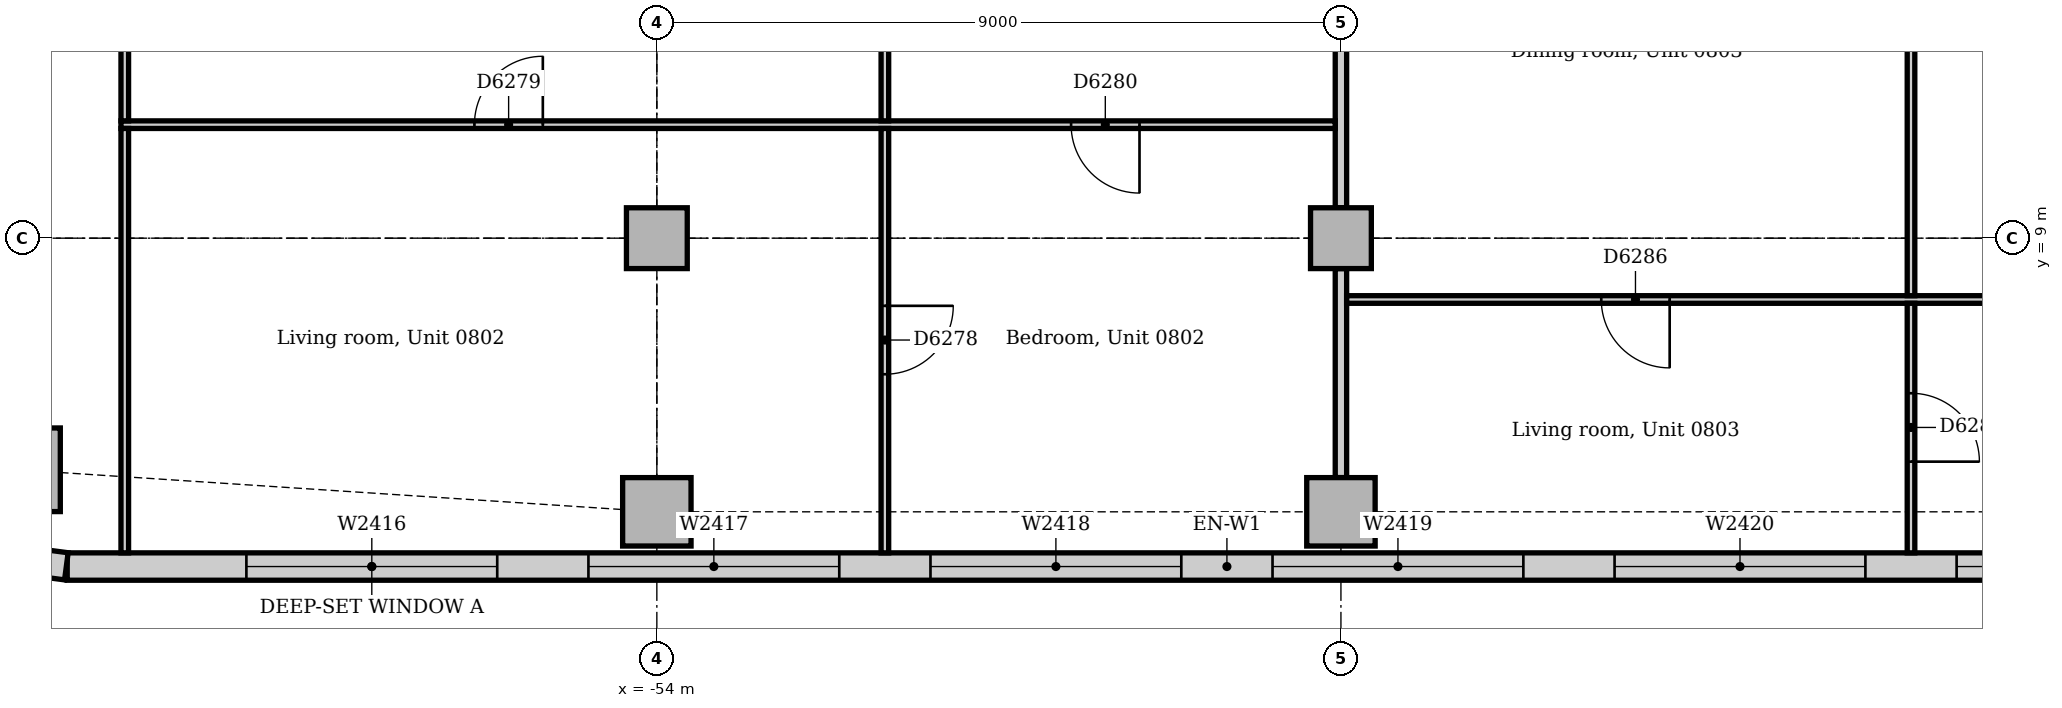
"""IFC4 building model, lengths in metres.
Left out: names, types, materials, properties, quantities, classifications, styles, units other than length and angle.
Written with IfcOpenShell. Run it as: python <this file> out.ifc"""

import sys

from ifc_helpers import new_model, si_unit, direction, frame, frame_2d, origin, origin_2d, place, context, subcontext, project, spatial, rectangle, extrude, element, fill, save


model = new_model("IFC4")
c1 = context("Model", 3, precision=1e-05, world=origin(), true_north=direction((0.0, 1.0)))
c2 = subcontext(c1, "Body", "Model", "MODEL_VIEW")
j1 = project(units=[si_unit("LENGTHUNIT", "METRE"), si_unit("PLANEANGLEUNIT", "RADIAN")], contexts=[c1])
p1 = place(None, origin())
s1 = spatial("IfcSite", under=j1, at=p1, CompositionType="ELEMENT")
p2 = place(p1, origin())
s2 = spatial("IfcBuilding", under=s1, at=p2, CompositionType="ELEMENT")
p3 = place(p2, frame((0.0, 0.0, 38.0)))
s3 = spatial("IfcBuildingStorey", under=s2, at=p3, CompositionType="ELEMENT", Elevation=38.0)
p4 = place(p3, frame((-62.398, 5.953, 0.0), z_axis=(0.0, 0.0, 1.0), x_axis=(1.0, 0.0, 0.0)))
e1 = element("IfcColumn", 1, at=p4, inside=s3, PredefinedType="COLUMN", context=c2, shape_type="SweptSolid", body=[
    extrude(rectangle(XDim=1.1, YDim=1.1, at=origin_2d()), origin(), (0.0, 0.0, 1.0), 3.85),
])
for number, where, z_axis, x_axis in (
    (2, (-54.0, 5.4, 0.0), (0.0, 0.0, 1.0), (1.0, 0.0, 0.0)),
    (3, (-45.0, 5.4, 0.0), (0.0, 0.0, 1.0), (1.0, 0.0, 0.0)),
):
    element("IfcColumn", number, at=place(p3, frame(where, z_axis=z_axis, x_axis=x_axis)), inside=s3, PredefinedType="COLUMN", context=c2, shape_type="SweptSolid", body=[
        extrude(rectangle(XDim=0.9, YDim=0.9, at=origin_2d()), origin(), (0.0, 0.0, 1.0), 3.85),
    ])
for number, where, z_axis, x_axis in (
    (4, (-54.0, 9.0, 0.0), (0.0, 0.0, 1.0), (1.0, 0.0, 0.0)),
    (5, (-45.0, 9.0, 0.0), (0.0, 0.0, 1.0), (1.0, 0.0, 0.0)),
):
    element("IfcColumn", number, at=place(p3, frame(where, z_axis=z_axis, x_axis=x_axis)), inside=s3, PredefinedType="COLUMN", context=c2, shape_type="SweptSolid", body=[
        extrude(rectangle(XDim=0.8, YDim=0.8, at=origin_2d()), origin(), (0.0, 0.0, 1.0), 3.85),
    ])
p5 = place(p3, frame((-61.757, 4.68, 0.0), z_axis=(0.0, 0.0, 1.0), x_axis=(1.0, 0.0, 0.0)))
e6 = element("IfcWall", 6, at=p5, inside=s3, PredefinedType="STANDARD", context=c2, shape_type="SweptSolid", body=[
    extrude(rectangle(XDim=30.515, YDim=0.36, at=frame_2d((15.257, 0.0))), origin(), (0.0, 0.0, 1.0), 3.85),
])
p6 = place(p5, frame((2.357, 0.0, 0.9)))
e7 = element("IfcOpeningElement", 7, at=p6, cuts=e6, PredefinedType="OPENING", context=c2, shape_type="SweptSolid", body=[
    extrude(rectangle(XDim=3.3, YDim=1.6, at=frame_2d((1.65, 0.8))), frame((0.0, 0.19, 0.0), z_axis=(0.0, -1.0, 0.0), x_axis=(1.0, 0.0, 0.0)), (0.0, 0.0, 1.0), 0.38),
])
p7 = place(p5, frame((6.857, 0.0, 0.9)))
e8 = element("IfcOpeningElement", 8, at=p7, cuts=e6, PredefinedType="OPENING", context=c2, shape_type="SweptSolid", body=[
    extrude(rectangle(XDim=3.3, YDim=1.6, at=frame_2d((1.65, 0.8))), frame((0.0, 0.19, 0.0), z_axis=(0.0, -1.0, 0.0), x_axis=(1.0, 0.0, 0.0)), (0.0, 0.0, 1.0), 0.38),
])
p8 = place(p5, frame((11.357, 0.0, 0.9)))
e9 = element("IfcOpeningElement", 9, at=p8, cuts=e6, PredefinedType="OPENING", context=c2, shape_type="SweptSolid", body=[
    extrude(rectangle(XDim=3.3, YDim=1.6, at=frame_2d((1.65, 0.8))), frame((0.0, 0.19, 0.0), z_axis=(0.0, -1.0, 0.0), x_axis=(1.0, 0.0, 0.0)), (0.0, 0.0, 1.0), 0.38),
])
p9 = place(p5, frame((15.857, 0.0, 0.9)))
e10 = element("IfcOpeningElement", 10, at=p9, cuts=e6, PredefinedType="OPENING", context=c2, shape_type="SweptSolid", body=[
    extrude(rectangle(XDim=3.3, YDim=1.6, at=frame_2d((1.65, 0.8))), frame((0.0, 0.19, 0.0), z_axis=(0.0, -1.0, 0.0), x_axis=(1.0, 0.0, 0.0)), (0.0, 0.0, 1.0), 0.38),
])
p10 = place(p5, frame((20.357, 0.0, 0.9)))
e11 = element("IfcOpeningElement", 11, at=p10, cuts=e6, PredefinedType="OPENING", context=c2, shape_type="SweptSolid", body=[
    extrude(rectangle(XDim=3.3, YDim=1.6, at=frame_2d((1.65, 0.8))), frame((0.0, 0.19, 0.0), z_axis=(0.0, -1.0, 0.0), x_axis=(1.0, 0.0, 0.0)), (0.0, 0.0, 1.0), 0.38),
])
p11 = place(p5, frame((24.857, 0.0, 0.9)))
e12 = element("IfcOpeningElement", 12, at=p11, cuts=e6, PredefinedType="OPENING", context=c2, shape_type="SweptSolid", body=[
    extrude(rectangle(XDim=3.3, YDim=1.6, at=frame_2d((1.65, 0.8))), frame((0.0, 0.19, 0.0), z_axis=(0.0, -1.0, 0.0), x_axis=(1.0, 0.0, 0.0)), (0.0, 0.0, 1.0), 0.38),
])
p12 = place(p3, frame((-62.476, 4.776, 0.0), z_axis=(0.0, 0.0, 1.0), x_axis=(0.99144092581, -0.13055608231, 0.0)))
e13 = element("IfcWall", 13, at=p12, inside=s3, PredefinedType="STANDARD", context=c2, shape_type="SweptSolid", body=[
    extrude(rectangle(XDim=0.713, YDim=0.36, at=frame_2d((0.356, 0.0))), origin(), (0.0, 0.0, 1.0), 3.85),
])
p13 = place(p3, frame((-45.0, 9.4, 0.0), z_axis=(0.0, 0.0, 1.0), x_axis=(0.0, 1.0, 0.0)))
e14 = element("IfcWall", 14, at=p13, inside=s3, PredefinedType="PARTITIONING", context=c2, shape_type="SweptSolid", body=[
    extrude(rectangle(XDim=8.2, YDim=0.15, at=frame_2d((4.1, 0.0))), origin(), (0.0, 0.0, 1.0), 3.158),
])
p14 = place(p3, frame((-45.0, 5.85, 0.0), z_axis=(0.0, 0.0, 1.0), x_axis=(0.0, 1.0, 0.0)))
e15 = element("IfcWall", 15, at=p14, inside=s3, PredefinedType="PARTITIONING", context=c2, shape_type="SweptSolid", body=[
    extrude(rectangle(XDim=2.75, YDim=0.15, at=frame_2d((1.375, 0.0))), origin(), (0.0, 0.0, 1.0), 3.652),
])
p15 = place(p3, frame((-44.925, 8.193, 0.0), z_axis=(0.0, 0.0, 1.0), x_axis=(1.0, 0.0, 0.0)))
e16 = element("IfcWall", 16, at=p15, inside=s3, PredefinedType="PARTITIONING", context=c2, shape_type="SweptSolid", body=[
    extrude(rectangle(XDim=15.922, YDim=0.1, at=frame_2d((7.961, 0.0))), origin(), (0.0, 0.0, 1.0), 3.85),
])
p16 = place(p15, frame((3.35, 0.0, 0.0)))
e17 = element("IfcOpeningElement", 17, at=p16, cuts=e16, PredefinedType="OPENING", context=c2, shape_type="SweptSolid", body=[
    extrude(rectangle(XDim=0.9, YDim=2.1, at=frame_2d((0.45, 1.05))), frame((0.0, 0.06, 0.0), z_axis=(0.0, -1.0, 0.0), x_axis=(1.0, 0.0, 0.0)), (0.0, 0.0, 1.0), 0.12),
])
p17 = place(p15, frame((11.125, 0.0, 0.0)))
e18 = element("IfcOpeningElement", 18, at=p17, cuts=e16, PredefinedType="OPENING", context=c2, shape_type="SweptSolid", body=[
    extrude(rectangle(XDim=0.9, YDim=2.1, at=frame_2d((0.45, 1.05))), frame((0.0, 0.06, 0.0), z_axis=(0.0, -1.0, 0.0), x_axis=(1.0, 0.0, 0.0)), (0.0, 0.0, 1.0), 0.12),
])
p18 = place(p3, frame((-61.05, 10.493, 0.0), z_axis=(0.0, 0.0, 1.0), x_axis=(1.0, 0.0, 0.0)))
e19 = element("IfcWall", 19, at=p18, inside=s3, PredefinedType="PARTITIONING", context=c2, shape_type="SweptSolid", body=[
    extrude(rectangle(XDim=15.975, YDim=0.1, at=frame_2d((7.987, 0.0))), origin(), (0.0, 0.0, 1.0), 3.85),
])
p19 = place(p18, frame((4.65, 0.0, 0.0)))
e20 = element("IfcOpeningElement", 20, at=p19, cuts=e19, PredefinedType="OPENING", context=c2, shape_type="SweptSolid", body=[
    extrude(rectangle(XDim=0.9, YDim=2.1, at=frame_2d((0.45, 1.05))), frame((0.0, 0.06, 0.0), z_axis=(0.0, -1.0, 0.0), x_axis=(1.0, 0.0, 0.0)), (0.0, 0.0, 1.0), 0.12),
])
p20 = place(p18, frame((12.5, 0.0, 0.0)))
e21 = element("IfcOpeningElement", 21, at=p20, cuts=e19, PredefinedType="OPENING", context=c2, shape_type="SweptSolid", body=[
    extrude(rectangle(XDim=0.9, YDim=2.1, at=frame_2d((0.45, 1.05))), frame((0.0, 0.06, 0.0), z_axis=(0.0, -1.0, 0.0), x_axis=(1.0, 0.0, 0.0)), (0.0, 0.0, 1.0), 0.12),
])
p21 = place(p3, frame((-61.0, 10.543, 0.0), z_axis=(0.0, 0.0, 1.0), x_axis=(0.0, 1.0, 0.0)))
e22 = element("IfcWall", 22, at=p21, inside=s3, PredefinedType="PARTITIONING", context=c2, shape_type="SweptSolid", body=[
    extrude(rectangle(XDim=4.207, YDim=0.1, at=frame_2d((2.103, 0.0))), origin(), (0.0, 0.0, 1.0), 3.85),
])
p22 = place(p3, frame((-61.0, 4.86, 0.0), z_axis=(0.0, 0.0, 1.0), x_axis=(0.0, 1.0, 0.0)))
e23 = element("IfcWall", 23, at=p22, inside=s3, PredefinedType="PARTITIONING", context=c2, shape_type="SweptSolid", body=[
    extrude(rectangle(XDim=5.583, YDim=0.1, at=frame_2d((2.792, 0.0))), origin(), (0.0, 0.0, 1.0), 3.85),
])
p23 = place(p3, frame((-51.0, 10.543, 0.0), z_axis=(0.0, 0.0, 1.0), x_axis=(0.0, 1.0, 0.0)))
e24 = element("IfcWall", 24, at=p23, inside=s3, PredefinedType="PARTITIONING", context=c2, shape_type="SweptSolid", body=[
    extrude(rectangle(XDim=4.207, YDim=0.1, at=frame_2d((2.103, 0.0))), origin(), (0.0, 0.0, 1.0), 3.85),
])
p24 = place(p3, frame((-51.0, 4.86, 0.0), z_axis=(0.0, 0.0, 1.0), x_axis=(0.0, 1.0, 0.0)))
e25 = element("IfcWall", 25, at=p24, inside=s3, PredefinedType="PARTITIONING", context=c2, shape_type="SweptSolid", body=[
    extrude(rectangle(XDim=5.583, YDim=0.1, at=frame_2d((2.792, 0.0))), origin(), (0.0, 0.0, 1.0), 3.85),
])
p25 = place(p24, frame((2.35, 0.0, 0.0)))
e26 = element("IfcOpeningElement", 26, at=p25, cuts=e25, PredefinedType="OPENING", context=c2, shape_type="SweptSolid", body=[
    extrude(rectangle(XDim=0.9, YDim=2.1, at=frame_2d((0.45, 1.05))), frame((0.0, 0.06, 0.0), z_axis=(0.0, -1.0, 0.0), x_axis=(1.0, 0.0, 0.0)), (0.0, 0.0, 1.0), 0.12),
])
p26 = place(p3, frame((-37.5, 8.243, 0.0), z_axis=(0.0, 0.0, 1.0), x_axis=(0.0, 1.0, 0.0)))
e27 = element("IfcWall", 27, at=p26, inside=s3, PredefinedType="PARTITIONING", context=c2, shape_type="SweptSolid", body=[
    extrude(rectangle(XDim=6.507, YDim=0.1, at=frame_2d((3.253, 0.0))), origin(), (0.0, 0.0, 1.0), 3.85),
])
p27 = place(p3, frame((-37.5, 4.86, 0.0), z_axis=(0.0, 0.0, 1.0), x_axis=(0.0, 1.0, 0.0)))
e28 = element("IfcWall", 28, at=p27, inside=s3, PredefinedType="PARTITIONING", context=c2, shape_type="SweptSolid", body=[
    extrude(rectangle(XDim=3.283, YDim=0.1, at=frame_2d((1.642, 0.0))), origin(), (0.0, 0.0, 1.0), 3.85),
])
p28 = place(p27, frame((1.2, 0.0, 0.0)))
e29 = element("IfcOpeningElement", 29, at=p28, cuts=e28, PredefinedType="OPENING", context=c2, shape_type="SweptSolid", body=[
    extrude(rectangle(XDim=0.9, YDim=2.1, at=frame_2d((0.45, 1.05))), frame((0.0, 0.06, 0.0), z_axis=(0.0, -1.0, 0.0), x_axis=(1.0, 0.0, 0.0)), (0.0, 0.0, 1.0), 0.12),
])
p29 = place(p6, origin())
e30 = element("IfcWindow", 30, at=p29, inside=s3, PartitioningType="SINGLE_PANEL", PredefinedType="WINDOW", context=c2, shape_type="SweptSolid", body=[
    extrude(rectangle(XDim=3.3, YDim=1.6, at=frame_2d((1.65, 0.8))), frame((0.0, 0.13, 0.0), z_axis=(0.0, -1.0, 0.0), x_axis=(1.0, 0.0, 0.0)), (0.0, 0.0, 1.0), 0.06),
])
fill(e7, e30)
p30 = place(p7, origin())
e31 = element("IfcWindow", 31, at=p30, inside=s3, PartitioningType="SINGLE_PANEL", PredefinedType="WINDOW", context=c2, shape_type="SweptSolid", body=[
    extrude(rectangle(XDim=3.3, YDim=1.6, at=frame_2d((1.65, 0.8))), frame((0.0, 0.13, 0.0), z_axis=(0.0, -1.0, 0.0), x_axis=(1.0, 0.0, 0.0)), (0.0, 0.0, 1.0), 0.06),
])
fill(e8, e31)
p31 = place(p8, origin())
e32 = element("IfcWindow", 32, at=p31, inside=s3, PartitioningType="SINGLE_PANEL", PredefinedType="WINDOW", context=c2, shape_type="SweptSolid", body=[
    extrude(rectangle(XDim=3.3, YDim=1.6, at=frame_2d((1.65, 0.8))), frame((0.0, 0.13, 0.0), z_axis=(0.0, -1.0, 0.0), x_axis=(1.0, 0.0, 0.0)), (0.0, 0.0, 1.0), 0.06),
])
fill(e9, e32)
p32 = place(p9, origin())
e33 = element("IfcWindow", 33, at=p32, inside=s3, PartitioningType="SINGLE_PANEL", PredefinedType="WINDOW", context=c2, shape_type="SweptSolid", body=[
    extrude(rectangle(XDim=3.3, YDim=1.6, at=frame_2d((1.65, 0.8))), frame((0.0, 0.13, 0.0), z_axis=(0.0, -1.0, 0.0), x_axis=(1.0, 0.0, 0.0)), (0.0, 0.0, 1.0), 0.06),
])
fill(e10, e33)
p33 = place(p10, origin())
e34 = element("IfcWindow", 34, at=p33, inside=s3, PartitioningType="SINGLE_PANEL", PredefinedType="WINDOW", context=c2, shape_type="SweptSolid", body=[
    extrude(rectangle(XDim=3.3, YDim=1.6, at=frame_2d((1.65, 0.8))), frame((0.0, 0.13, 0.0), z_axis=(0.0, -1.0, 0.0), x_axis=(1.0, 0.0, 0.0)), (0.0, 0.0, 1.0), 0.06),
])
fill(e11, e34)
p34 = place(p11, origin())
e35 = element("IfcWindow", 35, at=p34, inside=s3, PartitioningType="SINGLE_PANEL", PredefinedType="WINDOW", context=c2, shape_type="SweptSolid", body=[
    extrude(rectangle(XDim=3.3, YDim=1.6, at=frame_2d((1.65, 0.8))), frame((0.0, 0.13, 0.0), z_axis=(0.0, -1.0, 0.0), x_axis=(1.0, 0.0, 0.0)), (0.0, 0.0, 1.0), 0.06),
])
fill(e12, e35)
p35 = place(p25, frame((0.9, 0.0, 0.0), z_axis=(0.0, 0.0, 1.0), x_axis=(-1.0, 0.0, 0.0)))
e36 = element("IfcDoor", 36, at=p35, inside=s3, OperationType="SINGLE_SWING_LEFT", PredefinedType="DOOR", context=c2, shape_type="SweptSolid", body=[
    extrude(rectangle(XDim=0.9, YDim=2.1, at=frame_2d((0.45, 1.05))), frame((0.0, 0.025, 0.0), z_axis=(0.0, -1.0, 0.0), x_axis=(1.0, 0.0, 0.0)), (0.0, 0.0, 1.0), 0.05),
])
fill(e26, e36)
p36 = place(p19, origin())
e37 = element("IfcDoor", 37, at=p36, inside=s3, OperationType="SINGLE_SWING_RIGHT", PredefinedType="DOOR", context=c2, shape_type="SweptSolid", body=[
    extrude(rectangle(XDim=0.9, YDim=2.1, at=frame_2d((0.45, 1.05))), frame((0.0, 0.025, 0.0), z_axis=(0.0, -1.0, 0.0), x_axis=(1.0, 0.0, 0.0)), (0.0, 0.0, 1.0), 0.05),
])
fill(e20, e37)
p37 = place(p20, frame((0.9, 0.0, 0.0), z_axis=(0.0, 0.0, 1.0), x_axis=(-1.0, 0.0, 0.0)))
e38 = element("IfcDoor", 38, at=p37, inside=s3, OperationType="SINGLE_SWING_LEFT", PredefinedType="DOOR", context=c2, shape_type="SweptSolid", body=[
    extrude(rectangle(XDim=0.9, YDim=2.1, at=frame_2d((0.45, 1.05))), frame((0.0, 0.025, 0.0), z_axis=(0.0, -1.0, 0.0), x_axis=(1.0, 0.0, 0.0)), (0.0, 0.0, 1.0), 0.05),
])
fill(e21, e38)
p38 = place(p28, frame((0.9, 0.0, 0.0), z_axis=(0.0, 0.0, 1.0), x_axis=(-1.0, 0.0, 0.0)))
e39 = element("IfcDoor", 39, at=p38, inside=s3, OperationType="SINGLE_SWING_RIGHT", PredefinedType="DOOR", context=c2, shape_type="SweptSolid", body=[
    extrude(rectangle(XDim=0.9, YDim=2.1, at=frame_2d((0.45, 1.05))), frame((0.0, 0.025, 0.0), z_axis=(0.0, -1.0, 0.0), x_axis=(1.0, 0.0, 0.0)), (0.0, 0.0, 1.0), 0.05),
])
fill(e29, e39)
p39 = place(p16, frame((0.9, 0.0, 0.0), z_axis=(0.0, 0.0, 1.0), x_axis=(-1.0, 0.0, 0.0)))
e40 = element("IfcDoor", 40, at=p39, inside=s3, OperationType="SINGLE_SWING_LEFT", PredefinedType="DOOR", context=c2, shape_type="SweptSolid", body=[
    extrude(rectangle(XDim=0.9, YDim=2.1, at=frame_2d((0.45, 1.05))), frame((0.0, 0.025, 0.0), z_axis=(0.0, -1.0, 0.0), x_axis=(1.0, 0.0, 0.0)), (0.0, 0.0, 1.0), 0.05),
])
fill(e17, e40)
save(model, sys.argv[1])
